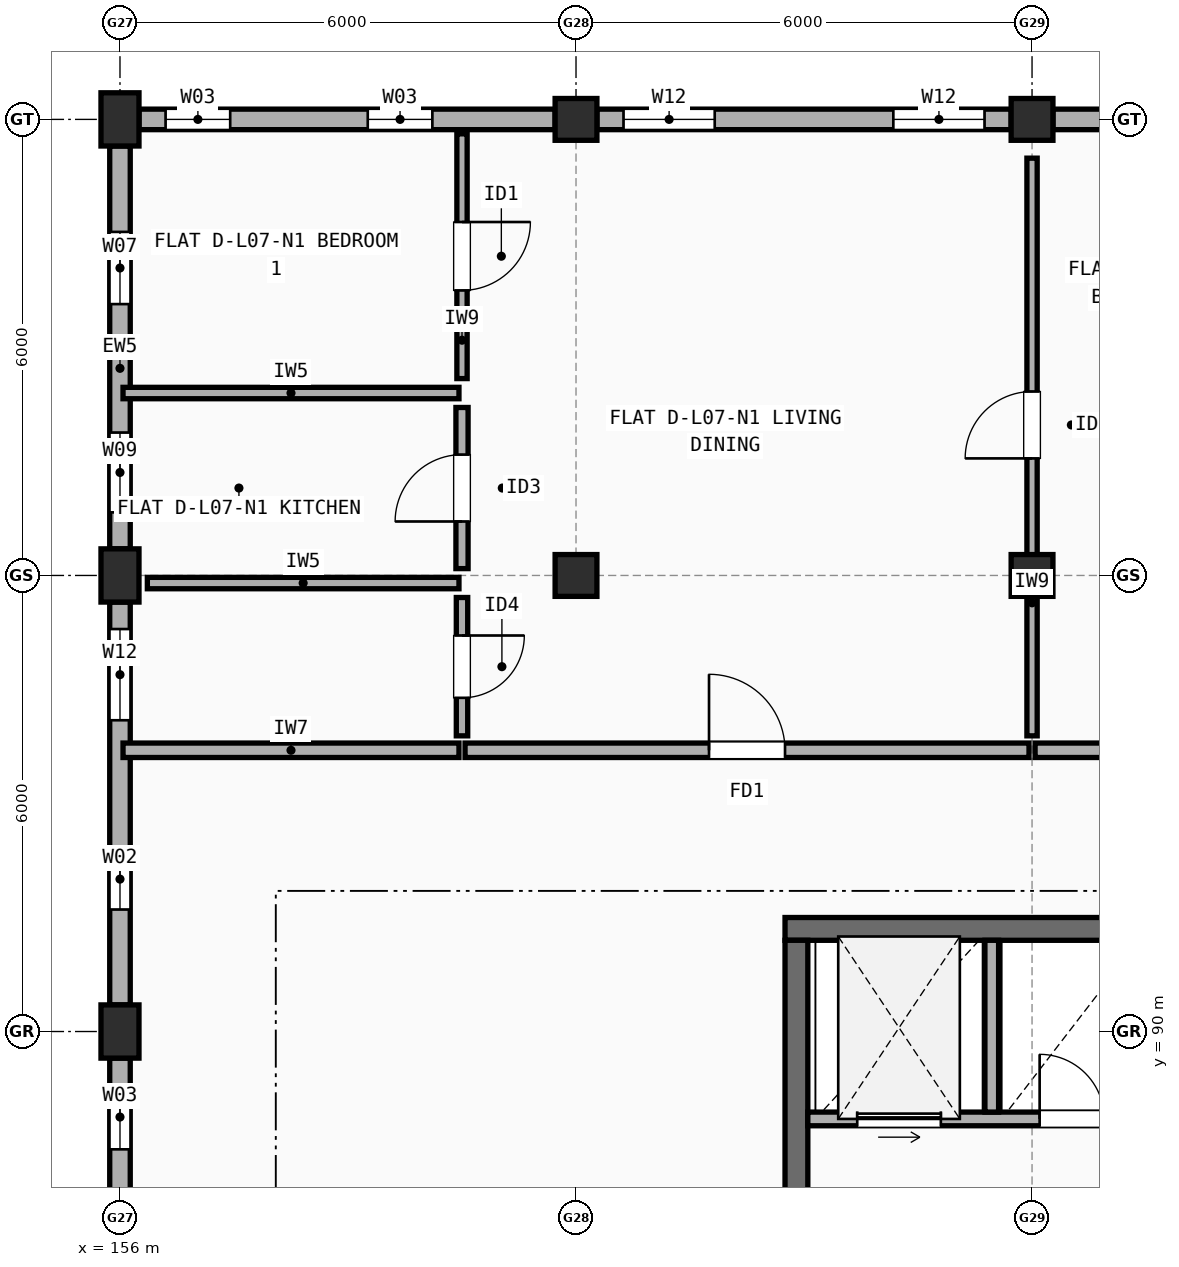
"""IFC4 building model, lengths in metres.
Left out: names, types, materials, properties, quantities, classifications, styles, units other than length and angle.
Written with IfcOpenShell. Run it as: python <this file> out.ifc"""

import sys

from ifc_helpers import new_model, si_unit, direction, frame, frame_2d, origin, origin_2d, place, context, subcontext, project, spatial, rectangle, extrude, element, fill, save


model = new_model("IFC4")
c1 = context("Model", 3, precision=1e-05, world=origin(), true_north=direction((0.0, 1.0)))
c2 = subcontext(c1, "Body", "Model", "MODEL_VIEW")
j1 = project(units=[si_unit("LENGTHUNIT", "METRE"), si_unit("PLANEANGLEUNIT", "RADIAN")], contexts=[c1])
p1 = place(None, origin())
s1 = spatial("IfcSite", under=j1, at=p1, CompositionType="ELEMENT")
p2 = place(p1, origin())
s2 = spatial("IfcBuilding", under=s1, at=p2, CompositionType="ELEMENT")
p3 = place(p2, frame((0.0, 0.0, 23.7)))
s3 = spatial("IfcBuildingStorey", under=s2, at=p3, CompositionType="ELEMENT", Elevation=23.7)
for number, where, z_axis, x_axis in (
    (1, (156.0, 90.0, 0.0), (0.0, 0.0, 1.0), (1.0, 0.0, 0.0)),
    (2, (156.0, 96.0, 0.0), (0.0, 0.0, 1.0), (1.0, 0.0, 0.0)),
    (3, (156.0, 102.0, 0.0), (0.0, 0.0, 1.0), (1.0, 0.0, 0.0)),
):
    element("IfcColumn", number, at=place(p3, frame(where, z_axis=z_axis, x_axis=x_axis)), inside=s3, PredefinedType="COLUMN", context=c2, shape_type="SweptSolid", body=[
        extrude(rectangle(XDim=0.5, YDim=0.7, at=origin_2d()), origin(), (0.0, 0.0, 1.0), 2.975),
    ])
for number, where, z_axis, x_axis in (
    (4, (162.0, 96.0, 0.0), (0.0, 0.0, 1.0), (1.0, 0.0, 0.0)),
    (5, (162.0, 102.0, 0.0), (0.0, 0.0, 1.0), (1.0, 0.0, 0.0)),
    (6, (168.0, 96.0, 0.0), (0.0, 0.0, 1.0), (1.0, 0.0, 0.0)),
    (7, (168.0, 102.0, 0.0), (0.0, 0.0, 1.0), (1.0, 0.0, 0.0)),
):
    element("IfcColumn", number, at=place(p3, frame(where, z_axis=z_axis, x_axis=x_axis)), inside=s3, PredefinedType="COLUMN", context=c2, shape_type="SweptSolid", body=[
        extrude(rectangle(XDim=0.55, YDim=0.55, at=origin_2d()), origin(), (0.0, 0.0, 1.0), 2.975),
    ])
p4 = place(p3, frame((173.725, 102.0, 0.0), z_axis=(0.0, 0.0, 1.0), x_axis=(-1.0, 0.0, 0.0)))
e8 = element("IfcWall", 8, at=p4, inside=s3, PredefinedType="STANDARD", context=c2, shape_type="SweptSolid", body=[
    extrude(rectangle(XDim=5.45, YDim=0.27, at=frame_2d((2.725, 0.0))), origin(), (0.0, 0.0, 1.0), 2.457),
])
p5 = place(p4, frame((0.867, 0.0, 0.9)))
e9 = element("IfcOpeningElement", 9, at=p5, cuts=e8, PredefinedType="OPENING", context=c2, shape_type="SweptSolid", body=[
    extrude(rectangle(XDim=0.95, YDim=1.35, at=frame_2d((0.475, 0.675))), frame((0.0, 0.145, 0.0), z_axis=(0.0, -1.0, 0.0), x_axis=(1.0, 0.0, 0.0)), (0.0, 0.0, 1.0), 0.29),
])
p6 = place(p4, frame((3.583, 0.0, 0.9)))
e10 = element("IfcOpeningElement", 10, at=p6, cuts=e8, PredefinedType="OPENING", context=c2, shape_type="SweptSolid", body=[
    extrude(rectangle(XDim=1.05, YDim=1.35, at=frame_2d((0.525, 0.675))), frame((0.0, 0.145, 0.0), z_axis=(0.0, -1.0, 0.0), x_axis=(1.0, 0.0, 0.0)), (0.0, 0.0, 1.0), 0.29),
])
p7 = place(p3, frame((167.725, 102.0, 0.0), z_axis=(0.0, 0.0, 1.0), x_axis=(-1.0, 0.0, 0.0)))
e11 = element("IfcWall", 11, at=p7, inside=s3, PredefinedType="STANDARD", context=c2, shape_type="SweptSolid", body=[
    extrude(rectangle(XDim=5.45, YDim=0.27, at=frame_2d((2.725, 0.0))), origin(), (0.0, 0.0, 1.0), 2.457),
])
p8 = place(p7, frame((0.35, 0.0, 0.9)))
e12 = element("IfcOpeningElement", 12, at=p8, cuts=e11, PredefinedType="OPENING", context=c2, shape_type="SweptSolid", body=[
    extrude(rectangle(XDim=1.2, YDim=1.35, at=frame_2d((0.6, 0.675))), frame((0.0, 0.145, 0.0), z_axis=(0.0, -1.0, 0.0), x_axis=(1.0, 0.0, 0.0)), (0.0, 0.0, 1.0), 0.29),
])
p9 = place(p7, frame((3.9, 0.0, 0.9)))
e13 = element("IfcOpeningElement", 13, at=p9, cuts=e11, PredefinedType="OPENING", context=c2, shape_type="SweptSolid", body=[
    extrude(rectangle(XDim=1.2, YDim=1.35, at=frame_2d((0.6, 0.675))), frame((0.0, 0.145, 0.0), z_axis=(0.0, -1.0, 0.0), x_axis=(1.0, 0.0, 0.0)), (0.0, 0.0, 1.0), 0.29),
])
p10 = place(p3, frame((161.725, 102.0, 0.0), z_axis=(0.0, 0.0, 1.0), x_axis=(-1.0, 0.0, 0.0)))
e14 = element("IfcWall", 14, at=p10, inside=s3, PredefinedType="STANDARD", context=c2, shape_type="SweptSolid", body=[
    extrude(rectangle(XDim=5.475, YDim=0.27, at=frame_2d((2.738, 0.0))), origin(), (0.0, 0.0, 1.0), 2.457),
])
p11 = place(p10, frame((1.615, 0.0, 0.9)))
e15 = element("IfcOpeningElement", 15, at=p11, cuts=e14, PredefinedType="OPENING", context=c2, shape_type="SweptSolid", body=[
    extrude(rectangle(XDim=0.85, YDim=1.25, at=frame_2d((0.425, 0.625))), frame((0.0, 0.145, 0.0), z_axis=(0.0, -1.0, 0.0), x_axis=(1.0, 0.0, 0.0)), (0.0, 0.0, 1.0), 0.29),
])
p12 = place(p10, frame((4.275, 0.0, 0.9)))
e16 = element("IfcOpeningElement", 16, at=p12, cuts=e14, PredefinedType="OPENING", context=c2, shape_type="SweptSolid", body=[
    extrude(rectangle(XDim=0.85, YDim=1.25, at=frame_2d((0.425, 0.625))), frame((0.0, 0.145, 0.0), z_axis=(0.0, -1.0, 0.0), x_axis=(1.0, 0.0, 0.0)), (0.0, 0.0, 1.0), 0.29),
])
p13 = place(p3, frame((156.0, 101.65, 0.0), z_axis=(0.0, 0.0, 1.0), x_axis=(0.0, -1.0, 0.0)))
e17 = element("IfcWall", 17, at=p13, inside=s3, PredefinedType="STANDARD", context=c2, shape_type="SweptSolid", body=[
    extrude(rectangle(XDim=5.3, YDim=0.27, at=frame_2d((2.65, 0.0))), origin(), (0.0, 0.0, 1.0), 2.457),
])
p14 = place(p13, frame((1.13, 0.0, 0.9)))
e18 = element("IfcOpeningElement", 18, at=p14, cuts=e17, PredefinedType="OPENING", context=c2, shape_type="SweptSolid", body=[
    extrude(rectangle(XDim=0.95, YDim=1.35, at=frame_2d((0.475, 0.675))), frame((0.0, 0.145, 0.0), z_axis=(0.0, -1.0, 0.0), x_axis=(1.0, 0.0, 0.0)), (0.0, 0.0, 1.0), 0.29),
])
p15 = place(p13, frame((3.77, 0.0, 0.9)))
e19 = element("IfcOpeningElement", 19, at=p15, cuts=e17, PredefinedType="OPENING", context=c2, shape_type="SweptSolid", body=[
    extrude(rectangle(XDim=1.05, YDim=1.35, at=frame_2d((0.525, 0.675))), frame((0.0, 0.145, 0.0), z_axis=(0.0, -1.0, 0.0), x_axis=(1.0, 0.0, 0.0)), (0.0, 0.0, 1.0), 0.29),
])
p16 = place(p3, frame((156.0, 95.65, 0.0), z_axis=(0.0, 0.0, 1.0), x_axis=(0.0, -1.0, 0.0)))
e20 = element("IfcWall", 20, at=p16, inside=s3, PredefinedType="STANDARD", context=c2, shape_type="SweptSolid", body=[
    extrude(rectangle(XDim=5.3, YDim=0.27, at=frame_2d((2.65, 0.0))), origin(), (0.0, 0.0, 1.0), 2.457),
])
p17 = place(p16, frame((0.355, 0.0, 0.9)))
e21 = element("IfcOpeningElement", 21, at=p17, cuts=e20, PredefinedType="OPENING", context=c2, shape_type="SweptSolid", body=[
    extrude(rectangle(XDim=1.2, YDim=1.35, at=frame_2d((0.6, 0.675))), frame((0.0, 0.145, 0.0), z_axis=(0.0, -1.0, 0.0), x_axis=(1.0, 0.0, 0.0)), (0.0, 0.0, 1.0), 0.29),
])
p18 = place(p16, frame((3.245, 0.0, 0.9)))
e22 = element("IfcOpeningElement", 22, at=p18, cuts=e20, PredefinedType="OPENING", context=c2, shape_type="SweptSolid", body=[
    extrude(rectangle(XDim=0.8, YDim=1.2, at=frame_2d((0.4, 0.6))), frame((0.0, 0.145, 0.0), z_axis=(0.0, -1.0, 0.0), x_axis=(1.0, 0.0, 0.0)), (0.0, 0.0, 1.0), 0.29),
])
p19 = place(p3, frame((156.0, 89.65, 0.0), z_axis=(0.0, 0.0, 1.0), x_axis=(0.0, -1.0, 0.0)))
e23 = element("IfcWall", 23, at=p19, inside=s3, PredefinedType="STANDARD", context=c2, shape_type="SweptSolid", body=[
    extrude(rectangle(XDim=5.3, YDim=0.27, at=frame_2d((2.65, 0.0))), origin(), (0.0, 0.0, 1.0), 2.457),
])
p20 = place(p19, frame((0.35, 0.0, 0.9)))
e24 = element("IfcOpeningElement", 24, at=p20, cuts=e23, PredefinedType="OPENING", context=c2, shape_type="SweptSolid", body=[
    extrude(rectangle(XDim=0.85, YDim=1.25, at=frame_2d((0.425, 0.625))), frame((0.0, 0.145, 0.0), z_axis=(0.0, -1.0, 0.0), x_axis=(1.0, 0.0, 0.0)), (0.0, 0.0, 1.0), 0.29),
])
p21 = place(p19, frame((4.1, 0.0, 0.9)))
e25 = element("IfcOpeningElement", 25, at=p21, cuts=e23, PredefinedType="OPENING", context=c2, shape_type="SweptSolid", body=[
    extrude(rectangle(XDim=0.85, YDim=1.25, at=frame_2d((0.425, 0.625))), frame((0.0, 0.145, 0.0), z_axis=(0.0, -1.0, 0.0), x_axis=(1.0, 0.0, 0.0)), (0.0, 0.0, 1.0), 0.29),
])
p22 = place(p3, frame((169.8, 91.35, 0.0), z_axis=(0.0, 0.0, 1.0), x_axis=(-1.0, 0.0, 0.0)))
e26 = element("IfcWall", 26, at=p22, inside=s3, PredefinedType="SHEAR", context=c2, shape_type="SweptSolid", body=[
    extrude(rectangle(XDim=5.05, YDim=0.3, at=frame_2d((2.525, 0.0))), origin(), (0.0, 0.0, 1.0), 2.975),
])
p23 = place(p3, frame((164.9, 87.75, 0.0), z_axis=(0.0, 0.0, 1.0), x_axis=(0.0, 1.0, 0.0)))
e27 = element("IfcWall", 27, at=p23, inside=s3, PredefinedType="SHEAR", context=c2, shape_type="SweptSolid", body=[
    extrude(rectangle(XDim=3.45, YDim=0.3, at=frame_2d((1.725, 0.0))), origin(), (0.0, 0.0, 1.0), 2.975),
])
p24 = place(p3, frame((165.05, 88.85, 0.0), z_axis=(0.0, 0.0, 1.0), x_axis=(1.0, 0.0, 0.0)))
e28 = element("IfcWall", 28, at=p24, inside=s3, PredefinedType="SOLIDWALL", context=c2, shape_type="SweptSolid", body=[
    extrude(rectangle(XDim=4.45, YDim=0.18, at=frame_2d((2.225, 0.0))), origin(), (0.0, 0.0, 1.0), 2.975),
])
p25 = place(p24, frame((0.65, 0.0, 0.0)))
e29 = element("IfcOpeningElement", 29, at=p25, cuts=e28, PredefinedType="OPENING", context=c2, shape_type="SweptSolid", body=[
    extrude(rectangle(XDim=1.1, YDim=2.15, at=frame_2d((0.55, 1.075))), frame((0.0, 0.1, 0.0), z_axis=(0.0, -1.0, 0.0), x_axis=(1.0, 0.0, 0.0)), (0.0, 0.0, 1.0), 0.2),
])
p26 = place(p24, frame((3.05, 0.0, 0.0)))
e30 = element("IfcOpeningElement", 30, at=p26, cuts=e28, PredefinedType="OPENING", context=c2, shape_type="SweptSolid", body=[
    extrude(rectangle(XDim=0.85, YDim=2.1, at=frame_2d((0.425, 1.05))), frame((0.0, 0.1, 0.0), z_axis=(0.0, -1.0, 0.0), x_axis=(1.0, 0.0, 0.0)), (0.0, 0.0, 1.0), 0.2),
])
p27 = place(p3, frame((167.47, 88.94, 0.0), z_axis=(0.0, 0.0, 1.0), x_axis=(0.0, 1.0, 0.0)))
e31 = element("IfcWall", 31, at=p27, inside=s3, PredefinedType="SOLIDWALL", context=c2, shape_type="SweptSolid", body=[
    extrude(rectangle(XDim=2.26, YDim=0.18, at=frame_2d((1.13, 0.0))), origin(), (0.0, 0.0, 1.0), 2.975),
])
p28 = place(p3, frame((156.04, 93.7, 0.0), z_axis=(0.0, 0.0, 1.0), x_axis=(1.0, 0.0, 0.0)))
e32 = element("IfcWall", 32, at=p28, inside=s3, PredefinedType="SOLIDWALL", context=c2, shape_type="SweptSolid", body=[
    extrude(rectangle(XDim=4.42, YDim=0.19, at=frame_2d((2.21, 0.0))), origin(), (0.0, 0.0, 1.0), 2.457),
])
p29 = place(p3, frame((160.54, 93.7, 0.0), z_axis=(0.0, 0.0, 1.0), x_axis=(1.0, 0.0, 0.0)))
e33 = element("IfcWall", 33, at=p29, inside=s3, PredefinedType="SOLIDWALL", context=c2, shape_type="SweptSolid", body=[
    extrude(rectangle(XDim=7.42, YDim=0.19, at=frame_2d((3.71, 0.0))), origin(), (0.0, 0.0, 1.0), 2.508),
])
p30 = place(p29, frame((3.21, 0.0, 0.0)))
e34 = element("IfcOpeningElement", 34, at=p30, cuts=e33, PredefinedType="OPENING", context=c2, shape_type="SweptSolid", body=[
    extrude(rectangle(XDim=1.0, YDim=2.15, at=frame_2d((0.5, 1.075))), frame((0.0, 0.105, 0.0), z_axis=(0.0, -1.0, 0.0), x_axis=(1.0, 0.0, 0.0)), (0.0, 0.0, 1.0), 0.21),
])
p31 = place(p3, frame((160.5, 98.59, 0.0), z_axis=(0.0, 0.0, 1.0), x_axis=(0.0, 1.0, 0.0)))
e35 = element("IfcWall", 35, at=p31, inside=s3, PredefinedType="PARTITIONING", context=c2, shape_type="SweptSolid", body=[
    extrude(rectangle(XDim=3.22, YDim=0.135, at=frame_2d((1.61, 0.0))), origin(), (0.0, 0.0, 1.0), 2.975),
])
p32 = place(p31, frame((1.16, 0.0, 0.0)))
e36 = element("IfcOpeningElement", 36, at=p32, cuts=e35, PredefinedType="OPENING", context=c2, shape_type="SweptSolid", body=[
    extrude(rectangle(XDim=0.9, YDim=2.1, at=frame_2d((0.45, 1.05))), frame((0.0, 0.077, 0.0), z_axis=(0.0, -1.0, 0.0), x_axis=(1.0, 0.0, 0.0)), (0.0, 0.0, 1.0), 0.155),
])
p33 = place(p3, frame((160.5, 96.09, 0.0), z_axis=(0.0, 0.0, 1.0), x_axis=(0.0, 1.0, 0.0)))
e37 = element("IfcWall", 37, at=p33, inside=s3, PredefinedType="PLUMBINGWALL", context=c2, shape_type="SweptSolid", body=[
    extrude(rectangle(XDim=2.12, YDim=0.16, at=frame_2d((1.06, 0.0))), origin(), (0.0, 0.0, 1.0), 2.975),
])
p34 = place(p33, frame((0.62, 0.0, 0.0)))
e38 = element("IfcOpeningElement", 38, at=p34, cuts=e37, PredefinedType="OPENING", context=c2, shape_type="SweptSolid", body=[
    extrude(rectangle(XDim=0.88, YDim=2.1, at=frame_2d((0.44, 1.05))), frame((0.0, 0.09, 0.0), z_axis=(0.0, -1.0, 0.0), x_axis=(1.0, 0.0, 0.0)), (0.0, 0.0, 1.0), 0.18),
])
p35 = place(p3, frame((160.5, 93.89, 0.0), z_axis=(0.0, 0.0, 1.0), x_axis=(0.0, 1.0, 0.0)))
e39 = element("IfcWall", 39, at=p35, inside=s3, PredefinedType="PARTITIONING", context=c2, shape_type="SweptSolid", body=[
    extrude(rectangle(XDim=1.82, YDim=0.15, at=frame_2d((0.91, 0.0))), origin(), (0.0, 0.0, 1.0), 2.975),
])
p36 = place(p35, frame((0.5, 0.0, 0.0)))
e40 = element("IfcOpeningElement", 40, at=p36, cuts=e39, PredefinedType="OPENING", context=c2, shape_type="SweptSolid", body=[
    extrude(rectangle(XDim=0.82, YDim=2.08, at=frame_2d((0.41, 1.04))), frame((0.0, 0.085, 0.0), z_axis=(0.0, -1.0, 0.0), x_axis=(1.0, 0.0, 0.0)), (0.0, 0.0, 1.0), 0.17),
])
p37 = place(p3, frame((156.04, 98.4, 0.0), z_axis=(0.0, 0.0, 1.0), x_axis=(1.0, 0.0, 0.0)))
e41 = element("IfcWall", 41, at=p37, inside=s3, PredefinedType="PARTITIONING", context=c2, shape_type="SweptSolid", body=[
    extrude(rectangle(XDim=4.42, YDim=0.15, at=frame_2d((2.21, 0.0))), origin(), (0.0, 0.0, 1.0), 2.457),
])
p38 = place(p3, frame((156.36, 95.9, 0.0), z_axis=(0.0, 0.0, 1.0), x_axis=(1.0, 0.0, 0.0)))
e42 = element("IfcWall", 42, at=p38, inside=s3, PredefinedType="PARTITIONING", context=c2, shape_type="SweptSolid", body=[
    extrude(rectangle(XDim=4.1, YDim=0.15, at=frame_2d((2.05, 0.0))), origin(), (0.0, 0.0, 1.0), 2.508),
])
p39 = place(p3, frame((168.04, 93.7, 0.0), z_axis=(0.0, 0.0, 1.0), x_axis=(1.0, 0.0, 0.0)))
e43 = element("IfcWall", 43, at=p39, inside=s3, PredefinedType="SOLIDWALL", context=c2, shape_type="SweptSolid", body=[
    extrude(rectangle(XDim=2.92, YDim=0.19, at=frame_2d((1.46, 0.0))), origin(), (0.0, 0.0, 1.0), 2.508),
])
p40 = place(p3, frame((168.0, 93.89, 0.0), z_axis=(0.0, 0.0, 1.0), x_axis=(0.0, 1.0, 0.0)))
e44 = element("IfcWall", 44, at=p40, inside=s3, PredefinedType="PARTITIONING", context=c2, shape_type="SweptSolid", body=[
    extrude(rectangle(XDim=7.6, YDim=0.135, at=frame_2d((3.8, 0.0))), origin(), (0.0, 0.0, 1.0), 2.508),
])
p41 = place(p40, frame((3.65, 0.0, 0.0)))
e45 = element("IfcOpeningElement", 45, at=p41, cuts=e44, PredefinedType="OPENING", context=c2, shape_type="SweptSolid", body=[
    extrude(rectangle(XDim=0.88, YDim=2.1, at=frame_2d((0.44, 1.05))), frame((0.0, 0.077, 0.0), z_axis=(0.0, -1.0, 0.0), x_axis=(1.0, 0.0, 0.0)), (0.0, 0.0, 1.0), 0.155),
])
p42 = place(p8, origin())
e46 = element("IfcWindow", 46, at=p42, inside=s3, PartitioningType="SINGLE_PANEL", PredefinedType="WINDOW", context=c2, shape_type="SweptSolid", body=[
    extrude(rectangle(XDim=1.2, YDim=1.35, at=frame_2d((0.6, 0.675))), frame((0.0, 0.03, 0.0), z_axis=(0.0, -1.0, 0.0), x_axis=(1.0, 0.0, 0.0)), (0.0, 0.0, 1.0), 0.06),
])
fill(e12, e46)
p43 = place(p9, origin())
e47 = element("IfcWindow", 47, at=p43, inside=s3, PartitioningType="SINGLE_PANEL", PredefinedType="WINDOW", context=c2, shape_type="SweptSolid", body=[
    extrude(rectangle(XDim=1.2, YDim=1.35, at=frame_2d((0.6, 0.675))), frame((0.0, 0.03, 0.0), z_axis=(0.0, -1.0, 0.0), x_axis=(1.0, 0.0, 0.0)), (0.0, 0.0, 1.0), 0.06),
])
fill(e13, e47)
p44 = place(p11, origin())
e48 = element("IfcWindow", 48, at=p44, inside=s3, PartitioningType="SINGLE_PANEL", PredefinedType="WINDOW", context=c2, shape_type="SweptSolid", body=[
    extrude(rectangle(XDim=0.85, YDim=1.25, at=frame_2d((0.425, 0.625))), frame((0.0, 0.03, 0.0), z_axis=(0.0, -1.0, 0.0), x_axis=(1.0, 0.0, 0.0)), (0.0, 0.0, 1.0), 0.06),
])
fill(e15, e48)
p45 = place(p12, origin())
e49 = element("IfcWindow", 49, at=p45, inside=s3, PartitioningType="SINGLE_PANEL", PredefinedType="WINDOW", context=c2, shape_type="SweptSolid", body=[
    extrude(rectangle(XDim=0.85, YDim=1.25, at=frame_2d((0.425, 0.625))), frame((0.0, 0.03, 0.0), z_axis=(0.0, -1.0, 0.0), x_axis=(1.0, 0.0, 0.0)), (0.0, 0.0, 1.0), 0.06),
])
fill(e16, e49)
p46 = place(p14, origin())
e50 = element("IfcWindow", 50, at=p46, inside=s3, PartitioningType="SINGLE_PANEL", PredefinedType="WINDOW", context=c2, shape_type="SweptSolid", body=[
    extrude(rectangle(XDim=0.95, YDim=1.35, at=frame_2d((0.475, 0.675))), frame((0.0, 0.03, 0.0), z_axis=(0.0, -1.0, 0.0), x_axis=(1.0, 0.0, 0.0)), (0.0, 0.0, 1.0), 0.06),
])
fill(e18, e50)
p47 = place(p15, origin())
e51 = element("IfcWindow", 51, at=p47, inside=s3, PartitioningType="SINGLE_PANEL", PredefinedType="WINDOW", context=c2, shape_type="SweptSolid", body=[
    extrude(rectangle(XDim=1.05, YDim=1.35, at=frame_2d((0.525, 0.675))), frame((0.0, 0.03, 0.0), z_axis=(0.0, -1.0, 0.0), x_axis=(1.0, 0.0, 0.0)), (0.0, 0.0, 1.0), 0.06),
])
fill(e19, e51)
p48 = place(p17, origin())
e52 = element("IfcWindow", 52, at=p48, inside=s3, PartitioningType="SINGLE_PANEL", PredefinedType="WINDOW", context=c2, shape_type="SweptSolid", body=[
    extrude(rectangle(XDim=1.2, YDim=1.35, at=frame_2d((0.6, 0.675))), frame((0.0, 0.03, 0.0), z_axis=(0.0, -1.0, 0.0), x_axis=(1.0, 0.0, 0.0)), (0.0, 0.0, 1.0), 0.06),
])
fill(e21, e52)
p49 = place(p18, origin())
e53 = element("IfcWindow", 53, at=p49, inside=s3, PartitioningType="SINGLE_PANEL", PredefinedType="WINDOW", context=c2, shape_type="SweptSolid", body=[
    extrude(rectangle(XDim=0.8, YDim=1.2, at=frame_2d((0.4, 0.6))), frame((0.0, 0.03, 0.0), z_axis=(0.0, -1.0, 0.0), x_axis=(1.0, 0.0, 0.0)), (0.0, 0.0, 1.0), 0.06),
])
fill(e22, e53)
p50 = place(p20, origin())
e54 = element("IfcWindow", 54, at=p50, inside=s3, PartitioningType="SINGLE_PANEL", PredefinedType="WINDOW", context=c2, shape_type="SweptSolid", body=[
    extrude(rectangle(XDim=0.85, YDim=1.25, at=frame_2d((0.425, 0.625))), frame((0.0, 0.03, 0.0), z_axis=(0.0, -1.0, 0.0), x_axis=(1.0, 0.0, 0.0)), (0.0, 0.0, 1.0), 0.06),
])
fill(e24, e54)
p51 = place(p25, origin())
e55 = element("IfcDoor", 55, at=p51, inside=s3, OperationType="SLIDING_TO_LEFT", PredefinedType="DOOR", context=c2, shape_type="SweptSolid", body=[
    extrude(rectangle(XDim=1.1, YDim=2.15, at=frame_2d((0.55, 1.075))), frame((0.0, 0.025, 0.0), z_axis=(0.0, -1.0, 0.0), x_axis=(1.0, 0.0, 0.0)), (0.0, 0.0, 1.0), 0.05),
])
fill(e29, e55)
p52 = place(p26, frame((0.85, 0.0, 0.0), z_axis=(0.0, 0.0, 1.0), x_axis=(-1.0, 0.0, 0.0)))
e56 = element("IfcDoor", 56, at=p52, inside=s3, OperationType="SINGLE_SWING_LEFT", PredefinedType="DOOR", context=c2, shape_type="SweptSolid", body=[
    extrude(rectangle(XDim=0.85, YDim=2.1, at=frame_2d((0.425, 1.05))), frame((0.0, 0.025, 0.0), z_axis=(0.0, -1.0, 0.0), x_axis=(1.0, 0.0, 0.0)), (0.0, 0.0, 1.0), 0.05),
])
fill(e30, e56)
p53 = place(p30, origin())
e57 = element("IfcDoor", 57, at=p53, inside=s3, OperationType="SINGLE_SWING_LEFT", PredefinedType="DOOR", context=c2, shape_type="SweptSolid", body=[
    extrude(rectangle(XDim=1.0, YDim=2.15, at=frame_2d((0.5, 1.075))), frame((0.0, 0.025, 0.0), z_axis=(0.0, -1.0, 0.0), x_axis=(1.0, 0.0, 0.0)), (0.0, 0.0, 1.0), 0.05),
])
fill(e34, e57)
p54 = place(p32, origin())
e58 = element("IfcDoor", 58, at=p54, inside=s3, OperationType="SINGLE_SWING_RIGHT", PredefinedType="DOOR", context=c2, shape_type="SweptSolid", body=[
    extrude(rectangle(XDim=0.9, YDim=2.1, at=frame_2d((0.45, 1.05))), frame((0.0, 0.025, 0.0), z_axis=(0.0, -1.0, 0.0), x_axis=(1.0, 0.0, 0.0)), (0.0, 0.0, 1.0), 0.05),
])
fill(e36, e58)
p55 = place(p34, origin())
e59 = element("IfcDoor", 59, at=p55, inside=s3, OperationType="SINGLE_SWING_LEFT", PredefinedType="DOOR", context=c2, shape_type="SweptSolid", body=[
    extrude(rectangle(XDim=0.88, YDim=2.1, at=frame_2d((0.44, 1.05))), frame((0.0, 0.025, 0.0), z_axis=(0.0, -1.0, 0.0), x_axis=(1.0, 0.0, 0.0)), (0.0, 0.0, 1.0), 0.05),
])
fill(e38, e59)
p56 = place(p36, origin())
e60 = element("IfcDoor", 60, at=p56, inside=s3, OperationType="SINGLE_SWING_RIGHT", PredefinedType="DOOR", context=c2, shape_type="SweptSolid", body=[
    extrude(rectangle(XDim=0.82, YDim=2.08, at=frame_2d((0.41, 1.04))), frame((0.0, 0.025, 0.0), z_axis=(0.0, -1.0, 0.0), x_axis=(1.0, 0.0, 0.0)), (0.0, 0.0, 1.0), 0.05),
])
fill(e40, e60)
p57 = place(p41, origin())
e61 = element("IfcDoor", 61, at=p57, inside=s3, OperationType="SINGLE_SWING_LEFT", PredefinedType="DOOR", context=c2, shape_type="SweptSolid", body=[
    extrude(rectangle(XDim=0.88, YDim=2.1, at=frame_2d((0.44, 1.05))), frame((0.0, 0.025, 0.0), z_axis=(0.0, -1.0, 0.0), x_axis=(1.0, 0.0, 0.0)), (0.0, 0.0, 1.0), 0.05),
])
fill(e45, e61)
save(model, sys.argv[1])
